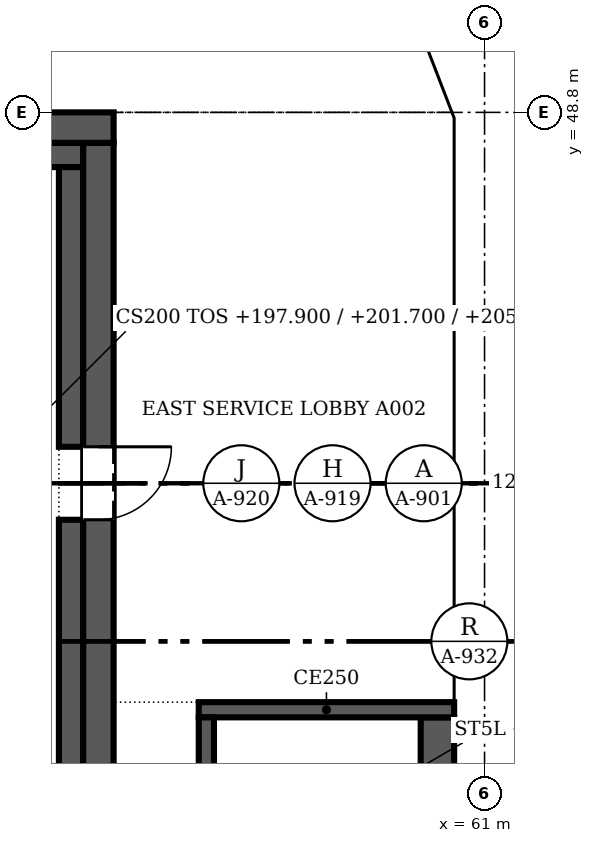
"""IFC4 building model, lengths in metres.
Left out: names, types, materials, properties, quantities, classifications, styles, units other than length and angle.
Written with IfcOpenShell. Run it as: python <this file> out.ifc"""

import sys

from ifc_helpers import new_model, si_unit, direction, frame, frame_2d, origin, place, context, subcontext, project, spatial, polyline, rectangle, outline, extrude, faceted_brep, source, transform, mapped, element, fill, save


model = new_model("IFC4")
c1 = context("Model", 3, precision=1e-05, world=origin(), true_north=direction((0.0, 1.0)))
c2 = subcontext(c1, "Body", "Model", "MODEL_VIEW")
j1 = project(units=[si_unit("LENGTHUNIT", "METRE"), si_unit("PLANEANGLEUNIT", "RADIAN")], contexts=[c1])
p1 = place(None, origin())
s1 = spatial("IfcSite", under=j1, at=p1, CompositionType="ELEMENT")
p2 = place(p1, origin())
s2 = spatial("IfcBuilding", under=s1, at=p2, CompositionType="ELEMENT")
p3 = place(p2, frame((0.0, 0.0, 197.9)))
s3 = spatial("IfcBuildingStorey", under=s2, at=p3, CompositionType="ELEMENT", Elevation=197.9)
m1 = source(origin(), c2, "Body", "Brep", [
    faceted_brep([(6.1, -0.25, 0.0), (3.05, -0.25, 3.8), (0.0, -0.25, 0.0), (6.1, -0.25, 0.0), (0.0, 0.25, 0.0), (3.05, 0.25, 3.8), (6.1, 0.25, 0.0), (6.1, 0.25, 0.0)], [[[0, 1, 2, 3]], [[4, 5, 6, 7]], [[6, 5, 1, 0]], [[5, 4, 2, 1]], [[4, 7, 3, 2]], [[3, 7, 6, 0]]]),
])
p4 = place(p3, frame((60.75, 36.6, 0.0), z_axis=(0.0, 0.0, 1.0), x_axis=(0.0, 1.0, 0.0)))
e1 = element("IfcWall", 1, at=p4, inside=s3, PredefinedType="SOLIDWALL", context=c2, shape_type="MappedRepresentation", body=[
    mapped(m1, transform((0.0, 0.0, 0.0), scale=1.0)),
])
m2 = source(origin(), c2, "Body", "SweptSolid", [
    extrude(outline(polyline([(5.579, 0.25), (3.05, 3.401), (0.521, 0.25), (5.579, 0.25)])), frame((0.0, 0.26, 0.0), z_axis=(0.0, -1.0, 0.0), x_axis=(1.0, 0.0, 0.0)), (0.0, 0.0, 1.0), 0.52),
])
p5 = place(p4, origin())
e2 = element("IfcOpeningElement", 2, at=p5, cuts=e1, PredefinedType="OPENING", context=c2, shape_type="MappedRepresentation", body=[
    mapped(m2, transform((0.0, 0.0, 0.0), scale=1.0)),
])
m3 = source(origin(), c2, "Body", "Brep", [
    faceted_brep([(6.053, -0.25, 0.0), (3.05, -0.25, 3.8), (0.0, -0.25, 0.0), (0.0, 0.25, 0.0), (3.05, 0.25, 3.8), (6.007, 0.25, 0.059), (6.007, 0.25, 0.0), (6.053, 0.0, 0.0)], [[[0, 1, 2]], [[3, 4, 5, 6]], [[5, 4, 1, 0, 7]], [[4, 3, 2, 1]], [[3, 6, 7, 0, 2]], [[7, 6, 5]]]),
])
p6 = place(p3, frame((60.75, 42.7, 0.0), z_axis=(0.0, 0.0, 1.0), x_axis=(0.0, 1.0, 0.0)))
e3 = element("IfcWall", 3, at=p6, inside=s3, PredefinedType="SOLIDWALL", context=c2, shape_type="MappedRepresentation", body=[
    mapped(m3, transform((0.0, 0.0, 0.0), scale=1.0)),
])
m4 = source(origin(), c2, "Body", "SweptSolid", [
    extrude(outline(polyline([(5.537, 0.25), (3.049, 3.399), (0.521, 0.25), (5.537, 0.25)])), frame((0.0, 0.26, 0.0), z_axis=(0.0, -1.0, 0.0), x_axis=(1.0, 0.0, 0.0)), (0.0, 0.0, 1.0), 0.52),
])
p7 = place(p6, origin())
e4 = element("IfcOpeningElement", 4, at=p7, cuts=e3, PredefinedType="OPENING", context=c2, shape_type="MappedRepresentation", body=[
    mapped(m4, transform((0.0, 0.0, 0.0), scale=1.0)),
])
m5 = source(origin(), c2, "Body", "Brep", [
    faceted_brep([(3.003, -0.25, 3.732), (2.95, -0.25, 3.8), (0.0, -0.25, 0.0), (3.003, -0.25, 0.0), (0.047, 0.25, 0.06), (2.898, 0.25, 3.732), (2.898, 0.25, 0.0), (0.047, 0.25, 0.0), (2.95, 0.0, 3.8), (0.0, 0.0, 0.0)], [[[0, 1, 2, 3]], [[4, 5, 6, 7]], [[8, 1, 0]], [[5, 4, 9, 2, 1, 8]], [[7, 6, 3, 2, 9]], [[7, 9, 4]], [[3, 6, 5, 8, 0]]]),
])
p8 = place(p3, frame((60.75, 48.753, 0.0), z_axis=(0.0, 0.0, 1.0), x_axis=(-0.35992665181, 0.932980602862, 0.0)))
e5 = element("IfcWall", 5, at=p8, inside=s3, PredefinedType="SOLIDWALL", context=c2, shape_type="MappedRepresentation", body=[
    mapped(m5, transform((0.0, 0.0, 0.0), scale=1.0)),
])
m6 = source(origin(), c2, "Body", "SweptSolid", [
    extrude(outline(polyline([(2.75, 3.135), (0.511, 0.25), (2.75, 0.25), (2.75, 3.135)])), frame((0.0, 0.26, 0.0), z_axis=(0.0, -1.0, 0.0), x_axis=(1.0, 0.0, 0.0)), (0.0, 0.0, 1.0), 0.52),
])
p9 = place(p8, origin())
e6 = element("IfcOpeningElement", 6, at=p9, cuts=e5, PredefinedType="OPENING", context=c2, shape_type="MappedRepresentation", body=[
    mapped(m6, transform((0.0, 0.0, 0.0), scale=1.0)),
])
p10 = place(p2, frame((0.0, 0.0, 201.7)))
s4 = spatial("IfcBuildingStorey", under=s2, at=p10, CompositionType="ELEMENT", Elevation=201.7)
m7 = source(origin(), c2, "Body", "Brep", [
    faceted_brep([(3.05, -0.25, 0.0), (6.1, -0.25, 3.8), (6.1, -0.25, 3.8), (3.05, -0.25, 7.6), (0.0, -0.25, 3.8), (0.0, 0.25, 3.8), (3.05, 0.25, 7.6), (6.1, 0.25, 3.8), (6.1, 0.25, 3.8), (3.05, 0.25, 0.0)], [[[0, 1, 2, 3, 4]], [[5, 6, 7, 8, 9]], [[9, 8, 1, 0]], [[7, 6, 3, 2]], [[6, 5, 4, 3]], [[5, 9, 0, 4]], [[1, 8, 7, 2]]]),
])
p11 = place(p10, frame((60.75, 33.55, -3.8), z_axis=(0.0, 0.0, 1.0), x_axis=(0.0, 1.0, 0.0)))
e7 = element("IfcWall", 7, at=p11, inside=s4, PredefinedType="SOLIDWALL", context=c2, shape_type="MappedRepresentation", body=[
    mapped(m7, transform((0.0, 0.0, 0.0), scale=1.0)),
])
m8 = source(origin(), c2, "Body", "SweptSolid", [
    extrude(outline(polyline([(3.05, 0.399), (5.78, 3.8), (3.05, 7.201), (0.321, 3.8), (3.05, 0.399)])), frame((0.0, 0.26, 0.0), z_axis=(0.0, -1.0, 0.0), x_axis=(1.0, 0.0, 0.0)), (0.0, 0.0, 1.0), 0.52),
])
p12 = place(p11, origin())
e8 = element("IfcOpeningElement", 8, at=p12, cuts=e7, PredefinedType="OPENING", context=c2, shape_type="MappedRepresentation", body=[
    mapped(m8, transform((0.0, 0.0, 0.0), scale=1.0)),
])
m9 = source(origin(), c2, "Body", "SweptSolid", [
    extrude(outline(polyline([(3.05, 0.0), (6.1, 3.8), (3.05, 7.6), (0.0, 3.8), (3.05, 0.0)])), frame((0.0, 0.25, 0.0), z_axis=(0.0, -1.0, 0.0), x_axis=(1.0, 0.0, 0.0)), (0.0, 0.0, 1.0), 0.5),
])
p13 = place(p10, frame((60.75, 39.65, -3.8), z_axis=(0.0, 0.0, 1.0), x_axis=(0.0, 1.0, 0.0)))
e9 = element("IfcWall", 9, at=p13, inside=s4, PredefinedType="SOLIDWALL", context=c2, shape_type="MappedRepresentation", body=[
    mapped(m9, transform((0.0, 0.0, 0.0), scale=1.0)),
])
p14 = place(p13, origin())
e10 = element("IfcOpeningElement", 10, at=p14, cuts=e9, PredefinedType="OPENING", context=c2, shape_type="MappedRepresentation", body=[
    mapped(m8, transform((0.0, 0.0, 0.0), scale=1.0)),
])
m10 = source(origin(), c2, "Body", "Brep", [
    faceted_brep([(3.003, -0.25, 0.0), (3.05, -0.25, 0.06), (3.05, -0.25, 7.54), (3.003, -0.25, 7.6), (0.0, -0.25, 3.8), (0.0, 0.25, 3.8), (2.957, 0.25, 7.541), (2.957, 0.25, 0.059), (3.003, 0.0, 0.0), (3.003, 0.0, 7.6)], [[[0, 1, 2, 3, 4]], [[5, 6, 7]], [[1, 0, 8]], [[9, 3, 2]], [[6, 5, 4, 3, 9]], [[5, 7, 8, 0, 4]], [[1, 8, 7, 6, 9, 2]]]),
])
p15 = place(p10, frame((60.75, 45.75, -3.8), z_axis=(0.0, 0.0, 1.0), x_axis=(0.0, 1.0, 0.0)))
e11 = element("IfcWall", 11, at=p15, inside=s4, PredefinedType="SOLIDWALL", context=c2, shape_type="MappedRepresentation", body=[
    mapped(m10, transform((0.0, 0.0, 0.0), scale=1.0)),
])
m11 = source(origin(), c2, "Body", "SweptSolid", [
    extrude(outline(polyline([(2.803, 6.944), (0.319, 3.8), (2.803, 0.656), (2.803, 6.944)])), frame((0.0, 0.26, 0.0), z_axis=(0.0, -1.0, 0.0), x_axis=(1.0, 0.0, 0.0)), (0.0, 0.0, 1.0), 0.52),
])
p16 = place(p15, origin())
e12 = element("IfcOpeningElement", 12, at=p16, cuts=e11, PredefinedType="OPENING", context=c2, shape_type="MappedRepresentation", body=[
    mapped(m11, transform((0.0, 0.0, 0.0), scale=1.0)),
])
m12 = source(origin(), c2, "Body", "Brep", [
    faceted_brep([(0.047, -0.25, 0.0), (2.997, -0.25, 3.8), (0.047, -0.25, 7.6), (0.0, -0.25, 7.541), (0.0, -0.25, 0.059), (0.093, 0.25, 7.54), (2.944, 0.25, 3.868), (2.944, 0.25, 3.732), (0.093, 0.25, 0.06), (2.997, 0.0, 3.8), (0.047, 0.0, 0.0), (0.047, 0.0, 7.6)], [[[0, 1, 2, 3, 4]], [[5, 6, 7, 8]], [[8, 7, 9, 1, 0, 10]], [[6, 5, 11, 2, 1, 9]], [[3, 2, 11]], [[10, 0, 4]], [[8, 10, 4, 3, 11, 5]], [[9, 7, 6]]]),
])
p17 = place(p10, frame((60.767, 48.71, -3.8), z_axis=(0.0, 0.0, 1.0), x_axis=(-0.359901446078, 0.932990326376, 0.0)))
e13 = element("IfcWall", 13, at=p17, inside=s4, PredefinedType="SOLIDWALL", context=c2, shape_type="MappedRepresentation", body=[
    mapped(m12, transform((0.0, 0.0, 0.0), scale=1.0)),
])
m13 = source(origin(), c2, "Body", "SweptSolid", [
    extrude(outline(polyline([(0.247, 0.665), (2.681, 3.8), (0.247, 6.935), (0.247, 0.665)])), frame((0.0, 0.26, 0.0), z_axis=(0.0, -1.0, 0.0), x_axis=(1.0, 0.0, 0.0)), (0.0, 0.0, 1.0), 0.52),
])
p18 = place(p17, origin())
e14 = element("IfcOpeningElement", 14, at=p18, cuts=e13, PredefinedType="OPENING", context=c2, shape_type="MappedRepresentation", body=[
    mapped(m13, transform((0.0, 0.0, 0.0), scale=1.0)),
])
p19 = place(p3, frame((30.5, 48.55, 0.0), z_axis=(0.0, 0.0, 1.0), x_axis=(1.0, 0.0, 0.0)))
e15 = element("IfcWall", 15, at=p19, inside=s3, PredefinedType="SHEAR", context=c2, shape_type="SweptSolid", body=[
    extrude(rectangle(XDim=24.4, YDim=0.5, at=frame_2d((12.2, 0.0))), origin(), (0.0, 0.0, 1.0), 3.8),
])
p20 = place(p3, frame((54.65, 48.3, 0.0), z_axis=(0.0, 0.0, 1.0), x_axis=(0.0, -1.0, 0.0)))
e16 = element("IfcWall", 16, at=p20, inside=s3, PredefinedType="SHEAR", context=c2, shape_type="SweptSolid", body=[
    extrude(rectangle(XDim=23.4, YDim=0.5, at=frame_2d((11.7, 0.0))), origin(), (0.0, 0.0, 1.0), 3.8),
])
m14 = source(origin(), c2, "Body", "SweptSolid", [
    extrude(rectangle(XDim=1.2, YDim=2.1, at=frame_2d((0.6, 1.05))), frame((0.0, 0.26, 0.0), z_axis=(0.0, -1.0, 0.0), x_axis=(1.0, 0.0, 0.0)), (0.0, 0.0, 1.0), 0.52),
])
p21 = place(p20, frame((5.0, 0.0, 0.0)))
e17 = element("IfcOpeningElement", 17, at=p21, cuts=e16, PredefinedType="OPENING", context=c2, shape_type="MappedRepresentation", body=[
    mapped(m14, transform((0.0, 0.0, 0.0), scale=1.0)),
])
p22 = place(p3, frame((31.0, 48.1, 0.0), z_axis=(0.0, 0.0, 1.0), x_axis=(1.0, 0.0, 0.0)))
e18 = element("IfcWall", 18, at=p22, inside=s3, PredefinedType="SOLIDWALL", context=c2, shape_type="SweptSolid", body=[
    extrude(rectangle(XDim=23.4, YDim=0.4, at=frame_2d((11.7, 0.0))), origin(), (0.0, 0.0, 1.0), 3.8),
])
p23 = place(p3, frame((54.2, 36.88, 0.0), z_axis=(0.0, 0.0, 1.0), x_axis=(0.0, 1.0, 0.0)))
e19 = element("IfcWall", 19, at=p23, inside=s3, PredefinedType="SOLIDWALL", context=c2, shape_type="SweptSolid", body=[
    extrude(rectangle(XDim=5.22, YDim=0.4, at=frame_2d((2.61, 0.0))), origin(), (0.0, 0.0, 1.0), 3.8),
])
p24 = place(p3, frame((54.2, 43.3, 0.0), z_axis=(0.0, 0.0, 1.0), x_axis=(0.0, 1.0, 0.0)))
e20 = element("IfcWall", 20, at=p24, inside=s3, PredefinedType="SOLIDWALL", context=c2, shape_type="SweptSolid", body=[
    extrude(rectangle(XDim=4.6, YDim=0.4, at=frame_2d((2.3, 0.0))), origin(), (0.0, 0.0, 1.0), 3.8),
])
p25 = place(p3, frame((56.425, 30.85, 0.0), z_axis=(0.0, 0.0, 1.0), x_axis=(0.0, 1.0, 0.0)))
e21 = element("IfcWall", 21, at=p25, inside=s3, PredefinedType="SOLIDWALL", context=c2, shape_type="SweptSolid", body=[
    extrude(rectangle(XDim=8.0, YDim=0.25, at=frame_2d((4.0, 0.0))), origin(), (0.0, 0.0, 1.0), 3.8),
])
p26 = place(p3, frame((56.3, 38.975, 0.0), z_axis=(0.0, 0.0, 1.0), x_axis=(1.0, 0.0, 0.0)))
e22 = element("IfcWall", 22, at=p26, inside=s3, PredefinedType="SOLIDWALL", context=c2, shape_type="SweptSolid", body=[
    extrude(rectangle(XDim=4.2, YDim=0.25, at=frame_2d((2.1, 0.0))), origin(), (0.0, 0.0, 1.0), 3.8),
])
p27 = place(p3, frame((60.225, 38.85, 0.0), z_axis=(0.0, 0.0, 1.0), x_axis=(0.0, -1.0, 0.0)))
e23 = element("IfcWall", 23, at=p27, inside=s3, PredefinedType="SOLIDWALL", context=c2, shape_type="SweptSolid", body=[
    extrude(rectangle(XDim=8.0, YDim=0.55, at=frame_2d((4.0, 0.0))), origin(), (0.0, 0.0, 1.0), 3.8),
])
m15 = source(origin(), c2, "Body", "SweptSolid", [
    extrude(rectangle(XDim=1.2, YDim=2.1, at=frame_2d((0.6, 1.05))), frame((0.0, 0.025, 0.0), z_axis=(0.0, -1.0, 0.0), x_axis=(1.0, 0.0, 0.0)), (0.0, 0.0, 1.0), 0.05),
])
p28 = place(p21, origin())
e24 = element("IfcDoor", 24, at=p28, inside=s3, OperationType="SINGLE_SWING_LEFT", PredefinedType="DOOR", context=c2, shape_type="MappedRepresentation", body=[
    mapped(m15, transform((0.0, 0.0, 0.0), scale=1.0)),
])
fill(e17, e24)
save(model, sys.argv[1])
